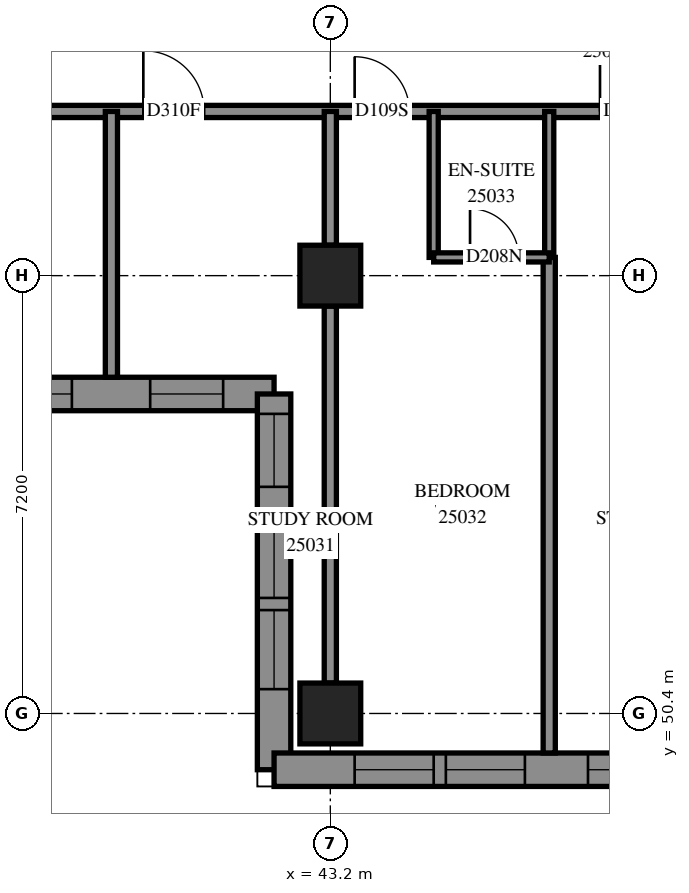
"""IFC4 building model, lengths in metres.
Left out: names, types, materials, properties, quantities, classifications, styles, units other than length and angle.
Written with IfcOpenShell. Run it as: python <this file> out.ifc"""

import sys

from ifc_helpers import new_model, si_unit, direction, frame, frame_2d, origin, origin_2d, place, context, subcontext, project, spatial, polyline, rectangle, outline, extrude, element, fill, save


model = new_model("IFC4")
c1 = context("Model", 3, precision=1e-05, world=origin(), true_north=direction((0.0, 1.0)))
c2 = subcontext(c1, "Body", "Model", "MODEL_VIEW")
j1 = project(units=[si_unit("LENGTHUNIT", "METRE"), si_unit("PLANEANGLEUNIT", "RADIAN")], contexts=[c1])
p1 = place(None, origin())
s1 = spatial("IfcSite", under=j1, at=p1, CompositionType="ELEMENT")
p2 = place(p1, origin())
s2 = spatial("IfcBuilding", under=s1, at=p2, CompositionType="ELEMENT")
p3 = place(p2, frame((0.0, 0.0, 94.8)))
s3 = spatial("IfcBuildingStorey", under=s2, at=p3, CompositionType="ELEMENT", Elevation=94.8)
for number, where, z_axis, x_axis in (
    (1, (43.2, 50.4, 0.0), (0.0, 0.0, 1.0), (1.0, 0.0, 0.0)),
    (2, (43.2, 57.6, 0.0), (0.0, 0.0, 1.0), (1.0, 0.0, 0.0)),
):
    element("IfcColumn", number, at=place(p3, frame(where, z_axis=z_axis, x_axis=x_axis)), inside=s3, PredefinedType="COLUMN", context=c2, shape_type="SweptSolid", body=[
        extrude(rectangle(XDim=1.0, YDim=1.0, at=origin_2d()), origin(), (0.0, 0.0, 1.0), 3.1),
    ])
p4 = place(p3, frame((27.875, 55.654, 0.0), z_axis=(0.0, 0.0, 1.0), x_axis=(1.0, 0.0, 0.0)))
e3 = element("IfcWall", 3, at=p4, inside=s3, PredefinedType="SOLIDWALL", context=c2, shape_type="SweptSolid", body=[
    extrude(outline(polyline([(-0.275, -0.275), (14.125, -0.275), (14.675, 0.275), (0.275, 0.275), (-0.275, -0.275)])), origin(), (0.0, 0.0, 1.0), 3.1),
])
p5 = place(p4, frame((1.175, 0.0, 0.5)))
e4 = element("IfcOpeningElement", 4, at=p5, cuts=e3, PredefinedType="OPENING", context=c2, shape_type="SweptSolid", body=[
    extrude(rectangle(XDim=1.3, YDim=2.45, at=frame_2d((0.65, 1.225))), frame((0.0, 0.285, 0.0), z_axis=(0.0, -1.0, 0.0), x_axis=(1.0, 0.0, 0.0)), (0.0, 0.0, 1.0), 0.57),
])
p6 = place(p4, frame((2.675, 0.0, 0.5)))
e5 = element("IfcOpeningElement", 5, at=p6, cuts=e3, PredefinedType="OPENING", context=c2, shape_type="SweptSolid", body=[
    extrude(rectangle(XDim=1.3, YDim=2.45, at=frame_2d((0.65, 1.225))), frame((0.0, 0.285, 0.0), z_axis=(0.0, -1.0, 0.0), x_axis=(1.0, 0.0, 0.0)), (0.0, 0.0, 1.0), 0.57),
])
p7 = place(p4, frame((4.925, 0.0, 0.5)))
e6 = element("IfcOpeningElement", 6, at=p7, cuts=e3, PredefinedType="OPENING", context=c2, shape_type="SweptSolid", body=[
    extrude(rectangle(XDim=1.3, YDim=2.45, at=frame_2d((0.65, 1.225))), frame((0.0, 0.285, 0.0), z_axis=(0.0, -1.0, 0.0), x_axis=(1.0, 0.0, 0.0)), (0.0, 0.0, 1.0), 0.57),
])
p8 = place(p4, frame((6.425, 0.0, 0.5)))
e7 = element("IfcOpeningElement", 7, at=p8, cuts=e3, PredefinedType="OPENING", context=c2, shape_type="SweptSolid", body=[
    extrude(rectangle(XDim=1.3, YDim=2.45, at=frame_2d((0.65, 1.225))), frame((0.0, 0.285, 0.0), z_axis=(0.0, -1.0, 0.0), x_axis=(1.0, 0.0, 0.0)), (0.0, 0.0, 1.0), 0.57),
])
p9 = place(p4, frame((8.275, 0.0, 0.5)))
e8 = element("IfcOpeningElement", 8, at=p9, cuts=e3, PredefinedType="OPENING", context=c2, shape_type="SweptSolid", body=[
    extrude(rectangle(XDim=1.3, YDim=2.45, at=frame_2d((0.65, 1.225))), frame((0.0, 0.285, 0.0), z_axis=(0.0, -1.0, 0.0), x_axis=(1.0, 0.0, 0.0)), (0.0, 0.0, 1.0), 0.57),
])
p10 = place(p4, frame((9.775, 0.0, 0.5)))
e9 = element("IfcOpeningElement", 9, at=p10, cuts=e3, PredefinedType="OPENING", context=c2, shape_type="SweptSolid", body=[
    extrude(rectangle(XDim=1.3, YDim=2.45, at=frame_2d((0.65, 1.225))), frame((0.0, 0.285, 0.0), z_axis=(0.0, -1.0, 0.0), x_axis=(1.0, 0.0, 0.0)), (0.0, 0.0, 1.0), 0.57),
])
p11 = place(p4, frame((12.363, 0.0, 0.5)))
e10 = element("IfcOpeningElement", 10, at=p11, cuts=e3, PredefinedType="OPENING", context=c2, shape_type="SweptSolid", body=[
    extrude(rectangle(XDim=1.2, YDim=2.45, at=frame_2d((0.6, 1.225))), frame((0.0, 0.285, 0.0), z_axis=(0.0, -1.0, 0.0), x_axis=(1.0, 0.0, 0.0)), (0.0, 0.0, 1.0), 0.57),
])
p12 = place(p3, frame((42.275, 55.654, 0.0), z_axis=(0.0, 0.0, 1.0), x_axis=(0.0, -1.0, 0.0)))
e11 = element("IfcWall", 11, at=p12, inside=s3, PredefinedType="SOLIDWALL", context=c2, shape_type="SweptSolid", body=[
    extrude(outline(polyline([(0.275, -0.275), (6.454, -0.275), (5.904, 0.275), (-0.275, 0.275), (0.275, -0.275)])), origin(), (0.0, 0.0, 1.0), 3.1),
])
p13 = place(p12, frame((2.054, 0.0, 0.5)))
e12 = element("IfcOpeningElement", 12, at=p13, cuts=e11, PredefinedType="OPENING", context=c2, shape_type="SweptSolid", body=[
    extrude(rectangle(XDim=1.3, YDim=2.45, at=frame_2d((0.65, 1.225))), frame((0.0, 0.285, 0.0), z_axis=(0.0, -1.0, 0.0), x_axis=(1.0, 0.0, 0.0)), (0.0, 0.0, 1.0), 0.57),
])
p14 = place(p12, frame((3.554, 0.0, 0.5)))
e13 = element("IfcOpeningElement", 13, at=p14, cuts=e11, PredefinedType="OPENING", context=c2, shape_type="SweptSolid", body=[
    extrude(rectangle(XDim=1.3, YDim=2.45, at=frame_2d((0.65, 1.225))), frame((0.0, 0.285, 0.0), z_axis=(0.0, -1.0, 0.0), x_axis=(1.0, 0.0, 0.0)), (0.0, 0.0, 1.0), 0.57),
])
p15 = place(p12, frame((0.327, 0.0, 0.5)))
e14 = element("IfcOpeningElement", 14, at=p15, cuts=e11, PredefinedType="OPENING", context=c2, shape_type="SweptSolid", body=[
    extrude(rectangle(XDim=1.2, YDim=2.45, at=frame_2d((0.6, 1.225))), frame((0.0, 0.285, 0.0), z_axis=(0.0, -1.0, 0.0), x_axis=(1.0, 0.0, 0.0)), (0.0, 0.0, 1.0), 0.57),
])
p16 = place(p3, frame((42.275, 49.475, 0.0), z_axis=(0.0, 0.0, 1.0), x_axis=(1.0, 0.0, 0.0)))
e15 = element("IfcWall", 15, at=p16, inside=s3, PredefinedType="SOLIDWALL", context=c2, shape_type="SweptSolid", body=[
    extrude(outline(polyline([(-0.275, -0.275), (6.925, -0.275), (7.475, 0.275), (0.275, 0.275), (-0.275, -0.275)])), origin(), (0.0, 0.0, 1.0), 3.1),
])
p17 = place(p16, frame((1.325, 0.0, 0.5)))
e16 = element("IfcOpeningElement", 16, at=p17, cuts=e15, PredefinedType="OPENING", context=c2, shape_type="SweptSolid", body=[
    extrude(rectangle(XDim=1.3, YDim=2.45, at=frame_2d((0.65, 1.225))), frame((0.0, 0.285, 0.0), z_axis=(0.0, -1.0, 0.0), x_axis=(1.0, 0.0, 0.0)), (0.0, 0.0, 1.0), 0.57),
])
p18 = place(p16, frame((2.825, 0.0, 0.5)))
e17 = element("IfcOpeningElement", 17, at=p18, cuts=e15, PredefinedType="OPENING", context=c2, shape_type="SweptSolid", body=[
    extrude(rectangle(XDim=1.3, YDim=2.45, at=frame_2d((0.65, 1.225))), frame((0.0, 0.285, 0.0), z_axis=(0.0, -1.0, 0.0), x_axis=(1.0, 0.0, 0.0)), (0.0, 0.0, 1.0), 0.57),
])
p19 = place(p16, frame((5.162, 0.0, 0.5)))
e18 = element("IfcOpeningElement", 18, at=p19, cuts=e15, PredefinedType="OPENING", context=c2, shape_type="SweptSolid", body=[
    extrude(rectangle(XDim=1.2, YDim=2.45, at=frame_2d((0.6, 1.225))), frame((0.0, 0.285, 0.0), z_axis=(0.0, -1.0, 0.0), x_axis=(1.0, 0.0, 0.0)), (0.0, 0.0, 1.0), 0.57),
])
p20 = place(p3, frame((28.802, 60.3, 0.0), z_axis=(0.0, 0.0, 1.0), x_axis=(1.0, 0.0, 0.0)))
e19 = element("IfcWall", 19, at=p20, inside=s3, PredefinedType="PARTITIONING", context=c2, shape_type="SweptSolid", body=[
    extrude(rectangle(XDim=24.298, YDim=0.2, at=frame_2d((12.149, 0.0))), origin(), (0.0, 0.0, 1.0), 3.1),
])
p21 = place(p20, frame((5.972, 0.0, 0.0)))
e20 = element("IfcOpeningElement", 20, at=p21, cuts=e19, PredefinedType="OPENING", context=c2, shape_type="SweptSolid", body=[
    extrude(rectangle(XDim=1.0, YDim=2.1, at=frame_2d((0.5, 1.05))), frame((0.0, 0.11, 0.0), z_axis=(0.0, -1.0, 0.0), x_axis=(1.0, 0.0, 0.0)), (0.0, 0.0, 1.0), 0.22),
])
p22 = place(p20, frame((11.323, 0.0, 0.0)))
e21 = element("IfcOpeningElement", 21, at=p22, cuts=e19, PredefinedType="OPENING", context=c2, shape_type="SweptSolid", body=[
    extrude(rectangle(XDim=1.0, YDim=2.1, at=frame_2d((0.5, 1.05))), frame((0.0, 0.11, 0.0), z_axis=(0.0, -1.0, 0.0), x_axis=(1.0, 0.0, 0.0)), (0.0, 0.0, 1.0), 0.22),
])
p23 = place(p20, frame((14.798, 0.0, 0.0)))
e22 = element("IfcOpeningElement", 22, at=p23, cuts=e19, PredefinedType="OPENING", context=c2, shape_type="SweptSolid", body=[
    extrude(rectangle(XDim=0.9, YDim=2.1, at=frame_2d((0.45, 1.05))), frame((0.0, 0.11, 0.0), z_axis=(0.0, -1.0, 0.0), x_axis=(1.0, 0.0, 0.0)), (0.0, 0.0, 1.0), 0.22),
])
p24 = place(p20, frame((18.833, 0.0, 0.0)))
e23 = element("IfcOpeningElement", 23, at=p24, cuts=e19, PredefinedType="OPENING", context=c2, shape_type="SweptSolid", body=[
    extrude(rectangle(XDim=1.0, YDim=2.1, at=frame_2d((0.5, 1.05))), frame((0.0, 0.11, 0.0), z_axis=(0.0, -1.0, 0.0), x_axis=(1.0, 0.0, 0.0)), (0.0, 0.0, 1.0), 0.22),
])
p25 = place(p20, frame((23.151, 0.0, 0.0)))
e24 = element("IfcOpeningElement", 24, at=p25, cuts=e19, PredefinedType="OPENING", context=c2, shape_type="SweptSolid", body=[
    extrude(rectangle(XDim=1.0, YDim=2.1, at=frame_2d((0.5, 1.05))), frame((0.0, 0.11, 0.0), z_axis=(0.0, -1.0, 0.0), x_axis=(1.0, 0.0, 0.0)), (0.0, 0.0, 1.0), 0.22),
])
p26 = place(p3, frame((46.8, 49.75, 0.0), z_axis=(0.0, 0.0, 1.0), x_axis=(0.0, 1.0, 0.0)))
e25 = element("IfcWall", 25, at=p26, inside=s3, PredefinedType="PARTITIONING", context=c2, shape_type="SweptSolid", body=[
    extrude(rectangle(XDim=8.15, YDim=0.2, at=frame_2d((4.075, 0.0))), origin(), (0.0, 0.0, 1.0), 3.1),
])
p27 = place(p3, frame((43.2, 50.9, 0.0), z_axis=(0.0, 0.0, 1.0), x_axis=(0.0, 1.0, 0.0)))
e26 = element("IfcWall", 26, at=p27, inside=s3, PredefinedType="PARTITIONING", context=c2, shape_type="SweptSolid", body=[
    extrude(rectangle(XDim=6.2, YDim=0.2, at=frame_2d((3.1, 0.0))), origin(), (0.0, 0.0, 1.0), 2.6),
])
p28 = place(p3, frame((39.6, 55.929, 0.0), z_axis=(0.0, 0.0, 1.0), x_axis=(0.0, 1.0, 0.0)))
e27 = element("IfcWall", 27, at=p28, inside=s3, PredefinedType="PARTITIONING", context=c2, shape_type="SweptSolid", body=[
    extrude(rectangle(XDim=4.371, YDim=0.2, at=frame_2d((2.186, 0.0))), origin(), (0.0, 0.0, 1.0), 3.1),
])
for number, where, z_axis, x_axis in (
    (28, (44.9, 57.9, 0.0), (0.0, 0.0, 1.0), (0.0, 1.0, 0.0)),
    (29, (46.8, 57.9, 0.0), (0.0, 0.0, 1.0), (0.0, 1.0, 0.0)),
):
    element("IfcWall", number, at=place(p3, frame(where, z_axis=z_axis, x_axis=x_axis)), inside=s3, PredefinedType="PARTITIONING", context=c2, shape_type="SweptSolid", body=[
        extrude(rectangle(XDim=2.4, YDim=0.15, at=frame_2d((1.2, 0.0))), origin(), (0.0, 0.0, 1.0), 3.1),
    ])
p29 = place(p3, frame((43.2, 58.1, 0.0), z_axis=(0.0, 0.0, 1.0), x_axis=(0.0, 1.0, 0.0)))
e30 = element("IfcWall", 30, at=p29, inside=s3, PredefinedType="PARTITIONING", context=c2, shape_type="SweptSolid", body=[
    extrude(rectangle(XDim=2.2, YDim=0.2, at=frame_2d((1.1, 0.0))), origin(), (0.0, 0.0, 1.0), 3.1),
])
p30 = place(p3, frame((44.9, 57.9, 0.0), z_axis=(0.0, 0.0, 1.0), x_axis=(1.0, 0.0, 0.0)))
e31 = element("IfcWall", 31, at=p30, inside=s3, PredefinedType="PARTITIONING", context=c2, shape_type="SweptSolid", body=[
    extrude(rectangle(XDim=1.9, YDim=0.15, at=frame_2d((0.95, 0.0))), origin(), (0.0, 0.0, 1.0), 3.1),
])
p31 = place(p30, frame((0.598, 0.0, 0.0)))
e32 = element("IfcOpeningElement", 32, at=p31, cuts=e31, PredefinedType="OPENING", context=c2, shape_type="SweptSolid", body=[
    extrude(rectangle(XDim=0.8, YDim=2.1, at=frame_2d((0.4, 1.05))), frame((0.0, 0.085, 0.0), z_axis=(0.0, -1.0, 0.0), x_axis=(1.0, 0.0, 0.0)), (0.0, 0.0, 1.0), 0.17),
])
p32 = place(p10, origin())
e33 = element("IfcWindow", 33, at=p32, inside=s3, PartitioningType="SINGLE_PANEL", PredefinedType="WINDOW", context=c2, shape_type="SweptSolid", body=[
    extrude(rectangle(XDim=1.3, YDim=2.45, at=frame_2d((0.65, 1.225))), frame((0.0, 0.155, 0.0), z_axis=(0.0, -1.0, 0.0), x_axis=(1.0, 0.0, 0.0)), (0.0, 0.0, 1.0), 0.06),
])
fill(e9, e33)
p33 = place(p11, origin())
e34 = element("IfcWindow", 34, at=p33, inside=s3, PartitioningType="SINGLE_PANEL", PredefinedType="WINDOW", context=c2, shape_type="SweptSolid", body=[
    extrude(rectangle(XDim=1.2, YDim=2.45, at=frame_2d((0.6, 1.225))), frame((0.0, 0.155, 0.0), z_axis=(0.0, -1.0, 0.0), x_axis=(1.0, 0.0, 0.0)), (0.0, 0.0, 1.0), 0.06),
])
fill(e10, e34)
p34 = place(p13, origin())
e35 = element("IfcWindow", 35, at=p34, inside=s3, PartitioningType="SINGLE_PANEL", PredefinedType="WINDOW", context=c2, shape_type="SweptSolid", body=[
    extrude(rectangle(XDim=1.3, YDim=2.45, at=frame_2d((0.65, 1.225))), frame((0.0, 0.155, 0.0), z_axis=(0.0, -1.0, 0.0), x_axis=(1.0, 0.0, 0.0)), (0.0, 0.0, 1.0), 0.06),
])
fill(e12, e35)
p35 = place(p14, origin())
e36 = element("IfcWindow", 36, at=p35, inside=s3, PartitioningType="SINGLE_PANEL", PredefinedType="WINDOW", context=c2, shape_type="SweptSolid", body=[
    extrude(rectangle(XDim=1.3, YDim=2.45, at=frame_2d((0.65, 1.225))), frame((0.0, 0.155, 0.0), z_axis=(0.0, -1.0, 0.0), x_axis=(1.0, 0.0, 0.0)), (0.0, 0.0, 1.0), 0.06),
])
fill(e13, e36)
p36 = place(p15, origin())
e37 = element("IfcWindow", 37, at=p36, inside=s3, PartitioningType="SINGLE_PANEL", PredefinedType="WINDOW", context=c2, shape_type="SweptSolid", body=[
    extrude(rectangle(XDim=1.2, YDim=2.45, at=frame_2d((0.6, 1.225))), frame((0.0, 0.155, 0.0), z_axis=(0.0, -1.0, 0.0), x_axis=(1.0, 0.0, 0.0)), (0.0, 0.0, 1.0), 0.06),
])
fill(e14, e37)
p37 = place(p17, origin())
e38 = element("IfcWindow", 38, at=p37, inside=s3, PartitioningType="SINGLE_PANEL", PredefinedType="WINDOW", context=c2, shape_type="SweptSolid", body=[
    extrude(rectangle(XDim=1.3, YDim=2.45, at=frame_2d((0.65, 1.225))), frame((0.0, 0.155, 0.0), z_axis=(0.0, -1.0, 0.0), x_axis=(1.0, 0.0, 0.0)), (0.0, 0.0, 1.0), 0.06),
])
fill(e16, e38)
p38 = place(p18, origin())
e39 = element("IfcWindow", 39, at=p38, inside=s3, PartitioningType="SINGLE_PANEL", PredefinedType="WINDOW", context=c2, shape_type="SweptSolid", body=[
    extrude(rectangle(XDim=1.3, YDim=2.45, at=frame_2d((0.65, 1.225))), frame((0.0, 0.155, 0.0), z_axis=(0.0, -1.0, 0.0), x_axis=(1.0, 0.0, 0.0)), (0.0, 0.0, 1.0), 0.06),
])
fill(e17, e39)
p39 = place(p19, origin())
e40 = element("IfcWindow", 40, at=p39, inside=s3, PartitioningType="SINGLE_PANEL", PredefinedType="WINDOW", context=c2, shape_type="SweptSolid", body=[
    extrude(rectangle(XDim=1.2, YDim=2.45, at=frame_2d((0.6, 1.225))), frame((0.0, 0.155, 0.0), z_axis=(0.0, -1.0, 0.0), x_axis=(1.0, 0.0, 0.0)), (0.0, 0.0, 1.0), 0.06),
])
fill(e18, e40)
p40 = place(p22, origin())
e41 = element("IfcDoor", 41, at=p40, inside=s3, OperationType="SINGLE_SWING_RIGHT", PredefinedType="DOOR", context=c2, shape_type="SweptSolid", body=[
    extrude(rectangle(XDim=1.0, YDim=2.1, at=frame_2d((0.5, 1.05))), frame((0.0, 0.025, 0.0), z_axis=(0.0, -1.0, 0.0), x_axis=(1.0, 0.0, 0.0)), (0.0, 0.0, 1.0), 0.05),
])
fill(e21, e41)
p41 = place(p23, origin())
e42 = element("IfcDoor", 42, at=p41, inside=s3, OperationType="SINGLE_SWING_LEFT", PredefinedType="DOOR", context=c2, shape_type="SweptSolid", body=[
    extrude(rectangle(XDim=0.9, YDim=2.1, at=frame_2d((0.45, 1.05))), frame((0.0, 0.025, 0.0), z_axis=(0.0, -1.0, 0.0), x_axis=(1.0, 0.0, 0.0)), (0.0, 0.0, 1.0), 0.05),
])
fill(e22, e42)
p42 = place(p31, origin())
e43 = element("IfcDoor", 43, at=p42, inside=s3, OperationType="SINGLE_SWING_RIGHT", PredefinedType="DOOR", context=c2, shape_type="SweptSolid", body=[
    extrude(rectangle(XDim=0.8, YDim=2.1, at=frame_2d((0.4, 1.05))), frame((0.0, 0.025, 0.0), z_axis=(0.0, -1.0, 0.0), x_axis=(1.0, 0.0, 0.0)), (0.0, 0.0, 1.0), 0.05),
])
fill(e32, e43)
p43 = place(p24, origin())
e44 = element("IfcDoor", 44, at=p43, inside=s3, OperationType="SINGLE_SWING_RIGHT", PredefinedType="DOOR", context=c2, shape_type="SweptSolid", body=[
    extrude(rectangle(XDim=1.0, YDim=2.1, at=frame_2d((0.5, 1.05))), frame((0.0, 0.025, 0.0), z_axis=(0.0, -1.0, 0.0), x_axis=(1.0, 0.0, 0.0)), (0.0, 0.0, 1.0), 0.05),
])
fill(e23, e44)
save(model, sys.argv[1])
